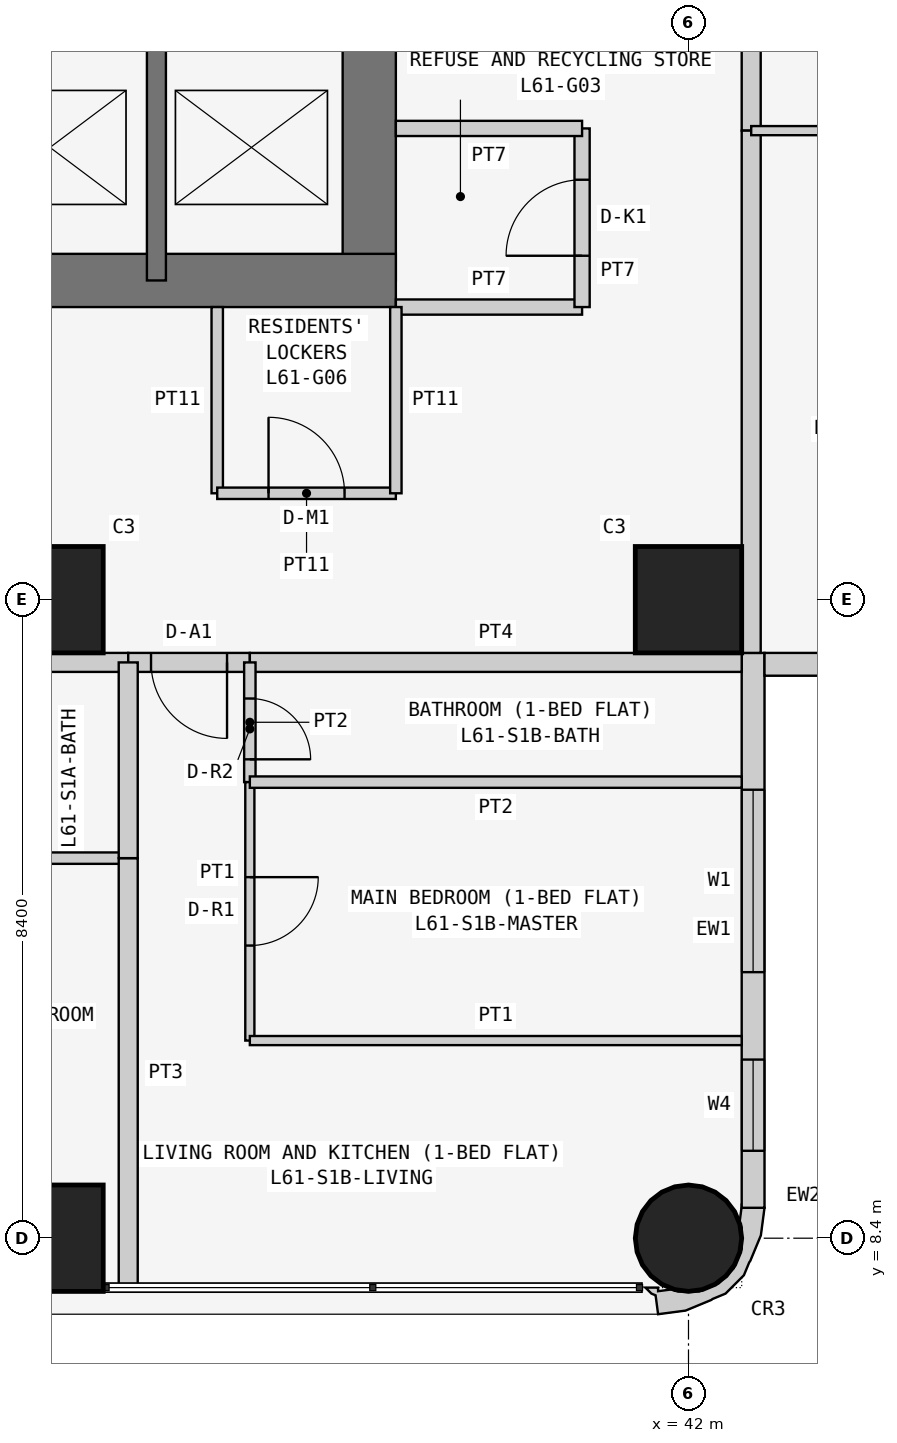
"""IFC4 building model, lengths in metres.
Left out: names, types, materials, properties, quantities, classifications, styles, units other than length and angle.
Written with IfcOpenShell. Run it as: python <this file> out.ifc"""

import sys

from ifc_helpers import new_model, si_unit, direction, frame, frame_2d, origin, origin_2d, place, context, subcontext, project, spatial, polyline, rectangle, circle, outline, extrude, element, fill, save


model = new_model("IFC4")
c1 = context("Model", 3, precision=1e-05, world=origin(), true_north=direction((0.0, 1.0)))
c2 = subcontext(c1, "Body", "Model", "MODEL_VIEW")
j1 = project(units=[si_unit("LENGTHUNIT", "METRE"), si_unit("PLANEANGLEUNIT", "RADIAN")], contexts=[c1])
p1 = place(None, origin())
s1 = spatial("IfcSite", under=j1, at=p1, CompositionType="ELEMENT")
p2 = place(p1, origin())
s2 = spatial("IfcBuilding", under=s1, at=p2, CompositionType="ELEMENT")
p3 = place(p2, frame((0.0, 0.0, 233.7)))
s3 = spatial("IfcBuildingStorey", under=s2, at=p3, CompositionType="ELEMENT", Elevation=233.7)
for number, where, z_axis, x_axis in (
    (1, (33.6, 8.4, 0.0), (0.0, 0.0, 1.0), (1.0, 0.0, 0.0)),
    (2, (33.6, 16.8, 0.0), (0.0, 0.0, 1.0), (1.0, 0.0, 0.0)),
):
    element("IfcColumn", number, at=place(p3, frame(where, z_axis=z_axis, x_axis=x_axis)), inside=s3, PredefinedType="COLUMN", context=c2, shape_type="SweptSolid", body=[
        extrude(rectangle(XDim=1.4, YDim=1.4, at=origin_2d()), origin(), (0.0, 0.0, 1.0), 3.6),
    ])
p4 = place(p3, frame((42.0, 8.4, 0.0), z_axis=(0.0, 0.0, 1.0), x_axis=(1.0, 0.0, 0.0)))
e3 = element("IfcColumn", 3, at=p4, inside=s3, PredefinedType="COLUMN", context=c2, shape_type="SweptSolid", body=[
    extrude(circle(Radius=0.7, at=origin_2d()), origin(), (0.0, 0.0, 1.0), 3.6),
])
p5 = place(p3, frame((42.0, 16.8, 0.0), z_axis=(0.0, 0.0, 1.0), x_axis=(1.0, 0.0, 0.0)))
e4 = element("IfcColumn", 4, at=p5, inside=s3, PredefinedType="COLUMN", context=c2, shape_type="SweptSolid", body=[
    extrude(rectangle(XDim=1.4, YDim=1.4, at=origin_2d()), origin(), (0.0, 0.0, 1.0), 3.6),
])
p6 = place(p3, frame((21.0, 21.0, 0.0), z_axis=(0.0, 0.0, 1.0), x_axis=(1.0, 0.0, 0.0)))
e5 = element("IfcWall", 5, at=p6, inside=s3, PredefinedType="SHEAR", context=c2, shape_type="SweptSolid", body=[
    extrude(rectangle(XDim=17.15, YDim=0.7, at=frame_2d((8.575, 0.0))), origin(), (0.0, 0.0, 1.0), 3.6),
])
p7 = place(p3, frame((37.8, 21.0, 0.0), z_axis=(0.0, 0.0, 1.0), x_axis=(0.0, 1.0, 0.0)))
e6 = element("IfcWall", 6, at=p7, inside=s3, PredefinedType="SHEAR", context=c2, shape_type="SweptSolid", body=[
    extrude(rectangle(XDim=17.15, YDim=0.7, at=frame_2d((8.575, 0.0))), origin(), (0.0, 0.0, 1.0), 3.6),
])
p8 = place(p7, frame((5.2, 0.0, 0.0)))
e7 = element("IfcOpeningElement", 7, at=p8, cuts=e6, PredefinedType="OPENING", context=c2, shape_type="SweptSolid", body=[
    extrude(rectangle(XDim=1.2, YDim=2.1, at=frame_2d((0.6, 1.05))), frame((0.0, 0.36, 0.0), z_axis=(0.0, -1.0, 0.0), x_axis=(1.0, 0.0, 0.0)), (0.0, 0.0, 1.0), 0.72),
])
p9 = place(p3, frame((35.0, 21.0, 0.0), z_axis=(0.0, 0.0, 1.0), x_axis=(0.0, 1.0, 0.0)))
e8 = element("IfcWall", 8, at=p9, inside=s3, PredefinedType="SHEAR", context=c2, shape_type="SweptSolid", body=[
    extrude(rectangle(XDim=3.2, YDim=0.25, at=frame_2d((1.6, 0.0))), origin(), (0.0, 0.0, 1.0), 3.6),
])
p10 = place(p3, frame((42.85, 8.8, 0.0), z_axis=(0.0, 0.0, 1.0), x_axis=(0.0, 1.0, 0.0)))
e9 = element("IfcWall", 9, at=p10, inside=s3, PredefinedType="SOLIDWALL", context=c2, shape_type="SweptSolid", body=[
    extrude(rectangle(XDim=7.3, YDim=0.3, at=frame_2d((3.65, 0.0))), origin(), (0.0, 0.0, 1.0), 3.45),
])
p11 = place(p10, frame((3.1, 0.0, 0.9)))
e10 = element("IfcOpeningElement", 10, at=p11, cuts=e9, PredefinedType="OPENING", context=c2, shape_type="SweptSolid", body=[
    extrude(rectangle(XDim=2.4, YDim=1.5, at=frame_2d((1.2, 0.75))), frame((0.0, 0.16, 0.0), z_axis=(0.0, -1.0, 0.0), x_axis=(1.0, 0.0, 0.0)), (0.0, 0.0, 1.0), 0.32),
])
p12 = place(p10, frame((0.75, 0.0, 0.9)))
e11 = element("IfcOpeningElement", 11, at=p12, cuts=e9, PredefinedType="OPENING", context=c2, shape_type="SweptSolid", body=[
    extrude(rectangle(XDim=1.2, YDim=1.5, at=frame_2d((0.6, 0.75))), frame((0.0, 0.16, 0.0), z_axis=(0.0, -1.0, 0.0), x_axis=(1.0, 0.0, 0.0)), (0.0, 0.0, 1.0), 0.32),
])
p13 = place(p3, frame((43.0, 15.95, 0.0), z_axis=(0.0, 0.0, 1.0), x_axis=(1.0, 0.0, 0.0)))
e12 = element("IfcWall", 12, at=p13, inside=s3, PredefinedType="SOLIDWALL", context=c2, shape_type="SweptSolid", body=[
    extrude(rectangle(XDim=7.0, YDim=0.3, at=frame_2d((3.5, 0.0))), origin(), (0.0, 0.0, 1.0), 3.45),
])
p14 = place(p13, frame((1.5, 0.0, 0.9)))
e13 = element("IfcOpeningElement", 13, at=p14, cuts=e12, PredefinedType="OPENING", context=c2, shape_type="SweptSolid", body=[
    extrude(rectangle(XDim=2.4, YDim=1.5, at=frame_2d((1.2, 0.75))), frame((0.0, 0.16, 0.0), z_axis=(0.0, -1.0, 0.0), x_axis=(1.0, 0.0, 0.0)), (0.0, 0.0, 1.0), 0.32),
])
p15 = place(p13, frame((5.05, 0.0, 0.9)))
e14 = element("IfcOpeningElement", 14, at=p15, cuts=e12, PredefinedType="OPENING", context=c2, shape_type="SweptSolid", body=[
    extrude(rectangle(XDim=1.2, YDim=1.5, at=frame_2d((0.6, 0.75))), frame((0.0, 0.16, 0.0), z_axis=(0.0, -1.0, 0.0), x_axis=(1.0, 0.0, 0.0)), (0.0, 0.0, 1.0), 0.32),
])
p16 = place(p3, frame((41.488, 7.812, 0.0), z_axis=(0.0, 0.0, 1.0), x_axis=(0.439933741929, -0.898030234854, 0.0)))
e15 = element("IfcWall", 15, at=p16, inside=s3, PredefinedType="SOLIDWALL", context=c2, shape_type="SweptSolid", body=[
    extrude(outline(polyline([(-0.222, 1.793), (-0.39, 1.541), (-0.372, 1.532), (-0.195, 1.414), (-0.12, 1.41), (0.131, 1.287), (0.315, 1.078), (0.406, 0.814), (0.388, 0.536), (0.265, 0.285), (0.209, 0.235), (0.148, 0.053), (0.105, 0.074), (0.032, -0.076), (0.138, -0.04), (0.182, -0.0), (0.419, -0.08), (0.536, 0.266), (0.559, 0.631), (0.555, 0.651), (0.566, 0.836), (0.455, 1.159), (0.333, 1.298), (0.324, 1.317), (0.082, 1.591), (-0.222, 1.793)])), origin(), (0.0, 0.0, 1.0), 3.45),
])
p17 = place(p3, frame((38.15, 20.65, 0.0), z_axis=(0.0, 0.0, 1.0), x_axis=(1.0, 0.0, 0.0)))
e16 = element("IfcWall", 16, at=p17, inside=s3, PredefinedType="PARTITIONING", context=c2, shape_type="SweptSolid", body=[
    extrude(rectangle(XDim=2.45, YDim=0.2, at=frame_2d((1.225, 0.0))), origin(), (0.0, 0.0, 1.0), 3.45),
])
p18 = place(p3, frame((40.6, 20.65, 0.0), z_axis=(0.0, 0.0, 1.0), x_axis=(0.0, 1.0, 0.0)))
e17 = element("IfcWall", 17, at=p18, inside=s3, PredefinedType="PARTITIONING", context=c2, shape_type="SweptSolid", body=[
    extrude(rectangle(XDim=2.35, YDim=0.2, at=frame_2d((1.175, 0.0))), origin(), (0.0, 0.0, 1.0), 3.45),
])
p19 = place(p18, frame((0.675, 0.0, 0.0)))
e18 = element("IfcOpeningElement", 18, at=p19, cuts=e17, PredefinedType="OPENING", context=c2, shape_type="SweptSolid", body=[
    extrude(rectangle(XDim=1.0, YDim=2.1, at=frame_2d((0.5, 1.05))), frame((0.0, 0.11, 0.0), z_axis=(0.0, -1.0, 0.0), x_axis=(1.0, 0.0, 0.0)), (0.0, 0.0, 1.0), 0.22),
])
p20 = place(p3, frame((40.6, 23.0, 0.0), z_axis=(0.0, 0.0, 1.0), x_axis=(-1.0, 0.0, 0.0)))
e19 = element("IfcWall", 19, at=p20, inside=s3, PredefinedType="PARTITIONING", context=c2, shape_type="SweptSolid", body=[
    extrude(rectangle(XDim=2.45, YDim=0.2, at=frame_2d((1.225, 0.0))), origin(), (0.0, 0.0, 1.0), 3.45),
])
p21 = place(p3, frame((35.8, 20.65, 0.0), z_axis=(0.0, 0.0, 1.0), x_axis=(0.0, -1.0, 0.0)))
e20 = element("IfcWall", 20, at=p21, inside=s3, PredefinedType="PARTITIONING", context=c2, shape_type="SweptSolid", body=[
    extrude(rectangle(XDim=2.45, YDim=0.15, at=frame_2d((1.225, 0.0))), origin(), (0.0, 0.0, 1.0), 3.45),
])
p22 = place(p3, frame((35.8, 18.2, 0.0), z_axis=(0.0, 0.0, 1.0), x_axis=(1.0, 0.0, 0.0)))
e21 = element("IfcWall", 21, at=p22, inside=s3, PredefinedType="PARTITIONING", context=c2, shape_type="SweptSolid", body=[
    extrude(rectangle(XDim=2.35, YDim=0.15, at=frame_2d((1.175, 0.0))), origin(), (0.0, 0.0, 1.0), 3.45),
])
p23 = place(p22, frame((0.675, 0.0, 0.0)))
e22 = element("IfcOpeningElement", 22, at=p23, cuts=e21, PredefinedType="OPENING", context=c2, shape_type="SweptSolid", body=[
    extrude(rectangle(XDim=1.0, YDim=2.1, at=frame_2d((0.5, 1.05))), frame((0.0, 0.085, 0.0), z_axis=(0.0, -1.0, 0.0), x_axis=(1.0, 0.0, 0.0)), (0.0, 0.0, 1.0), 0.17),
])
p24 = place(p3, frame((38.15, 18.2, 0.0), z_axis=(0.0, 0.0, 1.0), x_axis=(0.0, 1.0, 0.0)))
e23 = element("IfcWall", 23, at=p24, inside=s3, PredefinedType="PARTITIONING", context=c2, shape_type="SweptSolid", body=[
    extrude(rectangle(XDim=2.45, YDim=0.15, at=frame_2d((1.225, 0.0))), origin(), (0.0, 0.0, 1.0), 3.45),
])
p25 = place(p3, frame((42.825, 24.171, 0.0), z_axis=(0.0, 0.0, 1.0), x_axis=(0.0, -1.0, 0.0)))
e24 = element("IfcWall", 24, at=p25, inside=s3, PredefinedType="PARTITIONING", context=c2, shape_type="SweptSolid", body=[
    extrude(rectangle(XDim=1.2, YDim=0.25, at=frame_2d((0.6, 0.0))), origin(), (0.0, 0.0, 1.0), 3.45),
])
p26 = place(p3, frame((42.825, 22.971, 0.0), z_axis=(0.0, 0.0, 1.0), x_axis=(0.0, -1.0, 0.0)))
e25 = element("IfcWall", 25, at=p26, inside=s3, PredefinedType="PARTITIONING", context=c2, shape_type="SweptSolid", body=[
    extrude(rectangle(XDim=6.871, YDim=0.25, at=frame_2d((3.436, 0.0))), origin(), (0.0, 0.0, 1.0), 3.45),
])
p27 = place(p3, frame((34.629, 15.975, 0.0), z_axis=(0.0, 0.0, 1.0), x_axis=(-1.0, 0.0, 0.0)))
e26 = element("IfcWall", 26, at=p27, inside=s3, PredefinedType="PARTITIONING", context=c2, shape_type="SweptSolid", body=[
    extrude(rectangle(XDim=2.629, YDim=0.25, at=frame_2d((1.314, 0.0))), origin(), (0.0, 0.0, 1.0), 3.45),
])
p28 = place(p3, frame((36.229, 15.975, 0.0), z_axis=(0.0, 0.0, 1.0), x_axis=(-1.0, 0.0, 0.0)))
e27 = element("IfcWall", 27, at=p28, inside=s3, PredefinedType="PARTITIONING", context=c2, shape_type="SweptSolid", body=[
    extrude(rectangle(XDim=1.6, YDim=0.25, at=frame_2d((0.8, 0.0))), origin(), (0.0, 0.0, 1.0), 3.45),
])
p29 = place(p28, frame((0.3, 0.0, 0.0)))
e28 = element("IfcOpeningElement", 28, at=p29, cuts=e27, PredefinedType="OPENING", context=c2, shape_type="SweptSolid", body=[
    extrude(rectangle(XDim=1.0, YDim=2.1, at=frame_2d((0.5, 1.05))), frame((0.0, 0.135, 0.0), z_axis=(0.0, -1.0, 0.0), x_axis=(1.0, 0.0, 0.0)), (0.0, 0.0, 1.0), 0.27),
])
p30 = place(p3, frame((42.7, 15.975, 0.0), z_axis=(0.0, 0.0, 1.0), x_axis=(-1.0, 0.0, 0.0)))
e29 = element("IfcWall", 29, at=p30, inside=s3, PredefinedType="PARTITIONING", context=c2, shape_type="SweptSolid", body=[
    extrude(rectangle(XDim=6.471, YDim=0.25, at=frame_2d((3.235, 0.0))), origin(), (0.0, 0.0, 1.0), 3.45),
])
p31 = place(p3, frame((47.8, 22.971, 0.0), z_axis=(0.0, 0.0, 1.0), x_axis=(-1.0, 0.0, 0.0)))
e30 = element("IfcWall", 30, at=p31, inside=s3, PredefinedType="PARTITIONING", context=c2, shape_type="SweptSolid", body=[
    extrude(rectangle(XDim=4.975, YDim=0.12, at=frame_2d((2.488, 0.0))), origin(), (0.0, 0.0, 1.0), 3.45),
])
p32 = place(p31, frame((1.95, 0.0, 0.0)))
e31 = element("IfcOpeningElement", 31, at=p32, cuts=e30, PredefinedType="OPENING", context=c2, shape_type="SweptSolid", body=[
    extrude(rectangle(XDim=0.9, YDim=2.1, at=frame_2d((0.45, 1.05))), frame((0.0, 0.07, 0.0), z_axis=(0.0, -1.0, 0.0), x_axis=(1.0, 0.0, 0.0)), (0.0, 0.0, 1.0), 0.14),
])
p33 = place(p3, frame((32.0, 13.4, 0.0), z_axis=(0.0, 0.0, 1.0), x_axis=(1.0, 0.0, 0.0)))
e32 = element("IfcWall", 32, at=p33, inside=s3, PredefinedType="PARTITIONING", context=c2, shape_type="SweptSolid", body=[
    extrude(rectangle(XDim=2.629, YDim=0.15, at=frame_2d((1.314, 0.0))), origin(), (0.0, 0.0, 1.0), 3.45),
])
p34 = place(p3, frame((34.629, 13.4, 0.0), z_axis=(0.0, 0.0, 1.0), x_axis=(0.0, -1.0, 0.0)))
e33 = element("IfcWall", 33, at=p34, inside=s3, PredefinedType="PARTITIONING", context=c2, shape_type="SweptSolid", body=[
    extrude(rectangle(XDim=5.65, YDim=0.25, at=frame_2d((2.825, 0.0))), origin(), (0.0, 0.0, 1.0), 3.45),
])
p35 = place(p3, frame((34.629, 13.4, 0.0), z_axis=(0.0, 0.0, 1.0), x_axis=(0.0, 1.0, 0.0)))
e34 = element("IfcWall", 34, at=p35, inside=s3, PredefinedType="PARTITIONING", context=c2, shape_type="SweptSolid", body=[
    extrude(rectangle(XDim=2.575, YDim=0.25, at=frame_2d((1.288, 0.0))), origin(), (0.0, 0.0, 1.0), 3.45),
])
p36 = place(p3, frame((36.229, 15.975, 0.0), z_axis=(0.0, 0.0, 1.0), x_axis=(0.0, -1.0, 0.0)))
e35 = element("IfcWall", 35, at=p36, inside=s3, PredefinedType="PARTITIONING", context=c2, shape_type="SweptSolid", body=[
    extrude(rectangle(XDim=1.575, YDim=0.15, at=frame_2d((0.788, 0.0))), origin(), (0.0, 0.0, 1.0), 3.45),
])
p37 = place(p36, frame((0.475, 0.0, 0.0)))
e36 = element("IfcOpeningElement", 36, at=p37, cuts=e35, PredefinedType="OPENING", context=c2, shape_type="SweptSolid", body=[
    extrude(rectangle(XDim=0.8, YDim=2.1, at=frame_2d((0.4, 1.05))), frame((0.0, 0.085, 0.0), z_axis=(0.0, -1.0, 0.0), x_axis=(1.0, 0.0, 0.0)), (0.0, 0.0, 1.0), 0.17),
])
p38 = place(p3, frame((36.229, 14.4, 0.0), z_axis=(0.0, 0.0, 1.0), x_axis=(0.0, -1.0, 0.0)))
e37 = element("IfcWall", 37, at=p38, inside=s3, PredefinedType="PARTITIONING", context=c2, shape_type="SweptSolid", body=[
    extrude(rectangle(XDim=3.4, YDim=0.12, at=frame_2d((1.7, 0.0))), origin(), (0.0, 0.0, 1.0), 3.45),
])
p39 = place(p38, frame((1.25, 0.0, 0.0)))
e38 = element("IfcOpeningElement", 38, at=p39, cuts=e37, PredefinedType="OPENING", context=c2, shape_type="SweptSolid", body=[
    extrude(rectangle(XDim=0.9, YDim=2.1, at=frame_2d((0.45, 1.05))), frame((0.0, 0.07, 0.0), z_axis=(0.0, -1.0, 0.0), x_axis=(1.0, 0.0, 0.0)), (0.0, 0.0, 1.0), 0.14),
])
p40 = place(p3, frame((36.229, 11.0, 0.0), z_axis=(0.0, 0.0, 1.0), x_axis=(1.0, 0.0, 0.0)))
e39 = element("IfcWall", 39, at=p40, inside=s3, PredefinedType="PARTITIONING", context=c2, shape_type="SweptSolid", body=[
    extrude(rectangle(XDim=6.471, YDim=0.12, at=frame_2d((3.235, 0.0))), origin(), (0.0, 0.0, 1.0), 3.45),
])
p41 = place(p3, frame((36.229, 14.4, 0.0), z_axis=(0.0, 0.0, 1.0), x_axis=(1.0, 0.0, 0.0)))
e40 = element("IfcWall", 40, at=p41, inside=s3, PredefinedType="PARTITIONING", context=c2, shape_type="SweptSolid", body=[
    extrude(rectangle(XDim=6.471, YDim=0.15, at=frame_2d((3.235, 0.0))), origin(), (0.0, 0.0, 1.0), 3.45),
])
p42 = place(p11, origin())
e41 = element("IfcWindow", 41, at=p42, inside=s3, PartitioningType="SINGLE_PANEL", PredefinedType="WINDOW", context=c2, shape_type="SweptSolid", body=[
    extrude(rectangle(XDim=2.4, YDim=1.5, at=frame_2d((1.2, 0.75))), frame((0.0, 0.03, 0.0), z_axis=(0.0, -1.0, 0.0), x_axis=(1.0, 0.0, 0.0)), (0.0, 0.0, 1.0), 0.06),
])
fill(e10, e41)
p43 = place(p12, origin())
e42 = element("IfcWindow", 42, at=p43, inside=s3, PartitioningType="SINGLE_PANEL", PredefinedType="WINDOW", context=c2, shape_type="SweptSolid", body=[
    extrude(rectangle(XDim=1.2, YDim=1.5, at=frame_2d((0.6, 0.75))), frame((0.0, 0.03, 0.0), z_axis=(0.0, -1.0, 0.0), x_axis=(1.0, 0.0, 0.0)), (0.0, 0.0, 1.0), 0.06),
])
fill(e11, e42)
p44 = place(p19, origin())
e43 = element("IfcDoor", 43, at=p44, inside=s3, OperationType="SINGLE_SWING_LEFT", PredefinedType="DOOR", context=c2, shape_type="SweptSolid", body=[
    extrude(rectangle(XDim=1.0, YDim=2.1, at=frame_2d((0.5, 1.05))), frame((0.0, 0.025, 0.0), z_axis=(0.0, -1.0, 0.0), x_axis=(1.0, 0.0, 0.0)), (0.0, 0.0, 1.0), 0.05),
])
fill(e18, e43)
p45 = place(p23, origin())
e44 = element("IfcDoor", 44, at=p45, inside=s3, OperationType="SINGLE_SWING_LEFT", PredefinedType="DOOR", context=c2, shape_type="SweptSolid", body=[
    extrude(rectangle(XDim=1.0, YDim=2.1, at=frame_2d((0.5, 1.05))), frame((0.0, 0.025, 0.0), z_axis=(0.0, -1.0, 0.0), x_axis=(1.0, 0.0, 0.0)), (0.0, 0.0, 1.0), 0.05),
])
fill(e22, e44)
p46 = place(p29, origin())
e45 = element("IfcDoor", 45, at=p46, inside=s3, OperationType="SINGLE_SWING_LEFT", PredefinedType="DOOR", context=c2, shape_type="SweptSolid", body=[
    extrude(rectangle(XDim=1.0, YDim=2.1, at=frame_2d((0.5, 1.05))), frame((0.0, 0.025, 0.0), z_axis=(0.0, -1.0, 0.0), x_axis=(1.0, 0.0, 0.0)), (0.0, 0.0, 1.0), 0.05),
])
fill(e28, e45)
p47 = place(p37, origin())
e46 = element("IfcDoor", 46, at=p47, inside=s3, OperationType="SINGLE_SWING_RIGHT", PredefinedType="DOOR", context=c2, shape_type="SweptSolid", body=[
    extrude(rectangle(XDim=0.8, YDim=2.1, at=frame_2d((0.4, 1.05))), frame((0.0, 0.025, 0.0), z_axis=(0.0, -1.0, 0.0), x_axis=(1.0, 0.0, 0.0)), (0.0, 0.0, 1.0), 0.05),
])
fill(e36, e46)
p48 = place(p39, origin())
e47 = element("IfcDoor", 47, at=p48, inside=s3, OperationType="SINGLE_SWING_LEFT", PredefinedType="DOOR", context=c2, shape_type="SweptSolid", body=[
    extrude(rectangle(XDim=0.9, YDim=2.1, at=frame_2d((0.45, 1.05))), frame((0.0, 0.025, 0.0), z_axis=(0.0, -1.0, 0.0), x_axis=(1.0, 0.0, 0.0)), (0.0, 0.0, 1.0), 0.05),
])
fill(e38, e47)
save(model, sys.argv[1])
